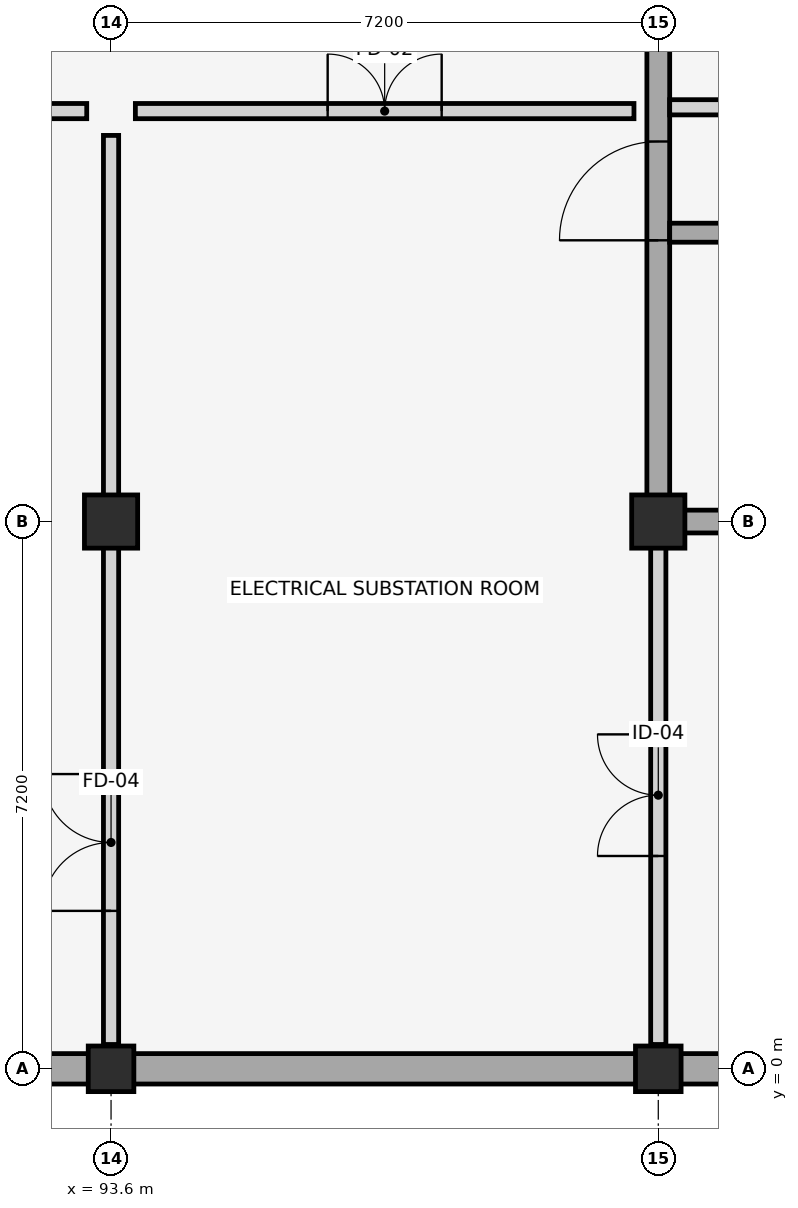
"""IFC4 building model, lengths in metres.
Left out: names, types, materials, properties, quantities, classifications, styles, units other than length and angle.
Written with IfcOpenShell. Run it as: python <this file> out.ifc"""

import sys

from ifc_helpers import new_model, si_unit, direction, frame, frame_2d, origin, origin_2d, place, context, subcontext, project, spatial, rectangle, extrude, element, fill, save


model = new_model("IFC4")
c1 = context("Model", 3, precision=1e-05, world=origin(), true_north=direction((0.0, 1.0)))
c2 = subcontext(c1, "Body", "Model", "MODEL_VIEW")
j1 = project(units=[si_unit("LENGTHUNIT", "METRE"), si_unit("PLANEANGLEUNIT", "RADIAN")], contexts=[c1])
p1 = place(None, origin())
s1 = spatial("IfcSite", under=j1, at=p1, CompositionType="ELEMENT")
p2 = place(p1, origin())
s2 = spatial("IfcBuilding", under=s1, at=p2, CompositionType="ELEMENT")
p3 = place(p2, frame((0.0, 0.0, -4.5)))
s3 = spatial("IfcBuildingStorey", under=s2, at=p3, CompositionType="ELEMENT", Elevation=-4.5)
p4 = place(p3, frame((57.4, 0.0, 0.0), z_axis=(0.0, 0.0, 1.0), x_axis=(1.0, 0.0, 0.0)))
e1 = element("IfcWall", 1, at=p4, inside=s3, PredefinedType="USERDEFINED", context=c2, shape_type="SweptSolid", body=[
    extrude(rectangle(XDim=50.8, YDim=0.4, at=frame_2d((25.4, 0.0))), origin(), (0.0, 0.0, 1.0), 3.67),
])
p5 = place(p3, frame((93.6, 0.0, -0.45), z_axis=(0.0, 0.0, 1.0), x_axis=(0.0, 1.0, 0.0)))
e2 = element("IfcColumn", 2, at=p5, inside=s3, PredefinedType="COLUMN", context=c2, shape_type="SweptSolid", body=[
    extrude(rectangle(XDim=0.6, YDim=0.6, at=origin_2d()), origin(), (0.0, 0.0, 1.0), 4.95),
])
p6 = place(p3, frame((93.6, 7.2, -0.45), z_axis=(0.0, 0.0, 1.0), x_axis=(1.0, 0.0, 0.0)))
e3 = element("IfcColumn", 3, at=p6, inside=s3, PredefinedType="COLUMN", context=c2, shape_type="SweptSolid", body=[
    extrude(rectangle(XDim=0.7, YDim=0.7, at=origin_2d()), origin(), (0.0, 0.0, 1.0), 4.95),
])
p7 = place(p3, frame((100.8, 0.0, -0.45), z_axis=(0.0, 0.0, 1.0), x_axis=(1.0, 0.0, 0.0)))
e4 = element("IfcColumn", 4, at=p7, inside=s3, PredefinedType="COLUMN", context=c2, shape_type="SweptSolid", body=[
    extrude(rectangle(XDim=0.6, YDim=0.6, at=origin_2d()), origin(), (0.0, 0.0, 1.0), 4.95),
])
p8 = place(p3, frame((100.8, 7.2, -0.45), z_axis=(0.0, 0.0, 1.0), x_axis=(0.0, 1.0, 0.0)))
e5 = element("IfcColumn", 5, at=p8, inside=s3, PredefinedType="COLUMN", context=c2, shape_type="SweptSolid", body=[
    extrude(rectangle(XDim=0.7, YDim=0.7, at=origin_2d()), origin(), (0.0, 0.0, 1.0), 4.95),
])
p9 = place(p3, frame((100.65, 7.2, 0.0), z_axis=(0.0, 0.0, 1.0), x_axis=(1.0, 0.0, 0.0)))
e6 = element("IfcWall", 6, at=p9, inside=s3, PredefinedType="SHEAR", context=c2, shape_type="SweptSolid", body=[
    extrude(rectangle(XDim=7.15, YDim=0.3, at=frame_2d((3.575, 0.0))), origin(), (0.0, 0.0, 1.0), 4.25),
])
p10 = place(p3, frame((100.8, 7.35, 0.0), z_axis=(0.0, 0.0, 1.0), x_axis=(0.0, 1.0, 0.0)))
e7 = element("IfcWall", 7, at=p10, inside=s3, PredefinedType="SHEAR", context=c2, shape_type="SweptSolid", body=[
    extrude(rectangle(XDim=14.1, YDim=0.3, at=frame_2d((7.05, 0.0))), origin(), (0.0, 0.0, 1.0), 4.25),
])
p11 = place(p10, frame((3.55, 0.0, 0.0)))
e8 = element("IfcOpeningElement", 8, at=p11, cuts=e7, PredefinedType="OPENING", context=c2, shape_type="SweptSolid", body=[
    extrude(rectangle(XDim=1.3, YDim=2.2, at=frame_2d((0.65, 1.1))), frame((0.0, 0.16, 0.0), z_axis=(0.0, -1.0, 0.0), x_axis=(1.0, 0.0, 0.0)), (0.0, 0.0, 1.0), 0.32),
])
p12 = place(p10, frame((7.85, 0.0, 0.0)))
e9 = element("IfcOpeningElement", 9, at=p12, cuts=e7, PredefinedType="OPENING", context=c2, shape_type="SweptSolid", body=[
    extrude(rectangle(XDim=1.05, YDim=2.15, at=frame_2d((0.525, 1.075))), frame((0.0, 0.16, 0.0), z_axis=(0.0, -1.0, 0.0), x_axis=(1.0, 0.0, 0.0)), (0.0, 0.0, 1.0), 0.32),
])
p13 = place(p10, frame((10.55, 0.0, 0.0)))
e10 = element("IfcOpeningElement", 10, at=p13, cuts=e7, PredefinedType="OPENING", context=c2, shape_type="SweptSolid", body=[
    extrude(rectangle(XDim=1.0, YDim=2.15, at=frame_2d((0.5, 1.075))), frame((0.0, 0.16, 0.0), z_axis=(0.0, -1.0, 0.0), x_axis=(1.0, 0.0, 0.0)), (0.0, 0.0, 1.0), 0.32),
])
p14 = place(p3, frame((100.95, 12.65, 0.0), z_axis=(0.0, 0.0, 1.0), x_axis=(1.0, 0.0, 0.0)))
e11 = element("IfcWall", 11, at=p14, inside=s3, PredefinedType="PLUMBINGWALL", context=c2, shape_type="SweptSolid", body=[
    extrude(rectangle(XDim=3.55, YDim=0.2, at=frame_2d((1.775, 0.0))), origin(), (0.0, 0.0, 1.0), 3.67),
])
p15 = place(p14, frame((0.9, 0.0, 0.0)))
e12 = element("IfcOpeningElement", 12, at=p15, cuts=e11, PredefinedType="OPENING", context=c2, shape_type="SweptSolid", body=[
    extrude(rectangle(XDim=0.85, YDim=2.05, at=frame_2d((0.425, 1.025))), frame((0.0, 0.11, 0.0), z_axis=(0.0, -1.0, 0.0), x_axis=(1.0, 0.0, 0.0)), (0.0, 0.0, 1.0), 0.22),
])
p16 = place(p3, frame((100.95, 11.0, 0.0), z_axis=(0.0, 0.0, 1.0), x_axis=(1.0, 0.0, 0.0)))
e13 = element("IfcWall", 13, at=p16, inside=s3, PredefinedType="SHEAR", context=c2, shape_type="SweptSolid", body=[
    extrude(rectangle(XDim=3.375, YDim=0.25, at=frame_2d((1.688, 0.0))), origin(), (0.0, 0.0, 1.0), 4.25),
])
p17 = place(p3, frame((65.12, 12.6, 0.0), z_axis=(0.0, 0.0, 1.0), x_axis=(1.0, 0.0, 0.0)))
e14 = element("IfcWall", 14, at=p17, inside=s3, PredefinedType="PARTITIONING", context=c2, shape_type="SweptSolid", body=[
    extrude(rectangle(XDim=28.16, YDim=0.2, at=frame_2d((14.08, 0.0))), origin(), (0.0, 0.0, 1.0), 3.45),
])
p18 = place(p17, frame((1.549, 0.0, 0.0)))
e15 = element("IfcOpeningElement", 15, at=p18, cuts=e14, PredefinedType="OPENING", context=c2, shape_type="SweptSolid", body=[
    extrude(rectangle(XDim=1.8, YDim=2.4, at=frame_2d((0.9, 1.2))), frame((0.0, 0.11, 0.0), z_axis=(0.0, -1.0, 0.0), x_axis=(1.0, 0.0, 0.0)), (0.0, 0.0, 1.0), 0.22),
])
p19 = place(p3, frame((93.92, 12.6, 0.0), z_axis=(0.0, 0.0, 1.0), x_axis=(1.0, 0.0, 0.0)))
e16 = element("IfcWall", 16, at=p19, inside=s3, PredefinedType="PARTITIONING", context=c2, shape_type="SweptSolid", body=[
    extrude(rectangle(XDim=6.56, YDim=0.2, at=frame_2d((3.28, 0.0))), origin(), (0.0, 0.0, 1.0), 3.45),
])
p20 = place(p19, frame((2.53, 0.0, 0.0)))
e17 = element("IfcOpeningElement", 17, at=p20, cuts=e16, PredefinedType="OPENING", context=c2, shape_type="SweptSolid", body=[
    extrude(rectangle(XDim=1.5, YDim=2.25, at=frame_2d((0.75, 1.125))), frame((0.0, 0.11, 0.0), z_axis=(0.0, -1.0, 0.0), x_axis=(1.0, 0.0, 0.0)), (0.0, 0.0, 1.0), 0.22),
])
p21 = place(p3, frame((93.6, 0.32, 0.0), z_axis=(0.0, 0.0, 1.0), x_axis=(0.0, 1.0, 0.0)))
e18 = element("IfcWall", 18, at=p21, inside=s3, PredefinedType="PARTITIONING", context=c2, shape_type="SweptSolid", body=[
    extrude(rectangle(XDim=11.96, YDim=0.2, at=frame_2d((5.98, 0.0))), origin(), (0.0, 0.0, 1.0), 3.45),
])
p22 = place(p21, frame((1.758, 0.0, 0.0)))
e19 = element("IfcOpeningElement", 19, at=p22, cuts=e18, PredefinedType="OPENING", context=c2, shape_type="SweptSolid", body=[
    extrude(rectangle(XDim=1.8, YDim=2.4, at=frame_2d((0.9, 1.2))), frame((0.0, 0.11, 0.0), z_axis=(0.0, -1.0, 0.0), x_axis=(1.0, 0.0, 0.0)), (0.0, 0.0, 1.0), 0.22),
])
p23 = place(p3, frame((100.8, 0.32, 0.0), z_axis=(0.0, 0.0, 1.0), x_axis=(0.0, 1.0, 0.0)))
e20 = element("IfcWall", 20, at=p23, inside=s3, PredefinedType="PARTITIONING", context=c2, shape_type="SweptSolid", body=[
    extrude(rectangle(XDim=6.56, YDim=0.2, at=frame_2d((3.28, 0.0))), origin(), (0.0, 0.0, 1.0), 3.45),
])
p24 = place(p23, frame((2.48, 0.0, 0.0)))
e21 = element("IfcOpeningElement", 21, at=p24, cuts=e20, PredefinedType="OPENING", context=c2, shape_type="SweptSolid", body=[
    extrude(rectangle(XDim=1.6, YDim=2.35, at=frame_2d((0.8, 1.175))), frame((0.0, 0.11, 0.0), z_axis=(0.0, -1.0, 0.0), x_axis=(1.0, 0.0, 0.0)), (0.0, 0.0, 1.0), 0.22),
])
p25 = place(p11, origin())
e22 = element("IfcDoor", 22, at=p25, inside=s3, OperationType="SINGLE_SWING_LEFT", PredefinedType="DOOR", context=c2, shape_type="SweptSolid", body=[
    extrude(rectangle(XDim=1.3, YDim=2.2, at=frame_2d((0.65, 1.1))), frame((0.0, 0.025, 0.0), z_axis=(0.0, -1.0, 0.0), x_axis=(1.0, 0.0, 0.0)), (0.0, 0.0, 1.0), 0.05),
])
fill(e8, e22)
p26 = place(p20, origin())
e23 = element("IfcDoor", 23, at=p26, inside=s3, OperationType="DOUBLE_DOOR_SINGLE_SWING", PredefinedType="DOOR", context=c2, shape_type="SweptSolid", body=[
    extrude(rectangle(XDim=1.5, YDim=2.25, at=frame_2d((0.75, 1.125))), frame((0.0, 0.025, 0.0), z_axis=(0.0, -1.0, 0.0), x_axis=(1.0, 0.0, 0.0)), (0.0, 0.0, 1.0), 0.05),
])
fill(e17, e23)
p27 = place(p22, origin())
e24 = element("IfcDoor", 24, at=p27, inside=s3, OperationType="DOUBLE_DOOR_SINGLE_SWING", PredefinedType="DOOR", context=c2, shape_type="SweptSolid", body=[
    extrude(rectangle(XDim=1.8, YDim=2.4, at=frame_2d((0.9, 1.2))), frame((0.0, 0.025, 0.0), z_axis=(0.0, -1.0, 0.0), x_axis=(1.0, 0.0, 0.0)), (0.0, 0.0, 1.0), 0.05),
])
fill(e19, e24)
p28 = place(p24, origin())
e25 = element("IfcDoor", 25, at=p28, inside=s3, OperationType="DOUBLE_DOOR_SINGLE_SWING", PredefinedType="DOOR", context=c2, shape_type="SweptSolid", body=[
    extrude(rectangle(XDim=1.6, YDim=2.35, at=frame_2d((0.8, 1.175))), frame((0.0, 0.025, 0.0), z_axis=(0.0, -1.0, 0.0), x_axis=(1.0, 0.0, 0.0)), (0.0, 0.0, 1.0), 0.05),
])
fill(e21, e25)
save(model, sys.argv[1])
